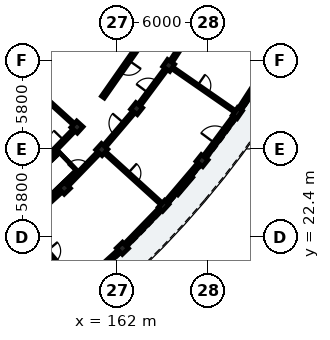
"""IFC4 building model, lengths in metres.
Left out: names, types, materials, properties, quantities, classifications, styles, units other than length and angle.
Written with IfcOpenShell. Run it as: python <this file> out.ifc"""

import sys

from ifc_helpers import new_model, si_unit, direction, frame, frame_2d, origin, origin_2d, place, context, subcontext, project, spatial, rectangle, extrude, element, fill, save


model = new_model("IFC4")
c1 = context("Model", 3, precision=1e-05, world=origin(), true_north=direction((0.0, 1.0)))
c2 = subcontext(c1, "Body", "Model", "MODEL_VIEW")
j1 = project(units=[si_unit("LENGTHUNIT", "METRE"), si_unit("PLANEANGLEUNIT", "RADIAN")], contexts=[c1])
p1 = place(None, origin())
s1 = spatial("IfcSite", under=j1, at=p1, CompositionType="ELEMENT")
p2 = place(p1, origin())
s2 = spatial("IfcBuilding", under=s1, at=p2, CompositionType="ELEMENT")
p3 = place(p2, frame((0.0, 0.0, 15.56)))
s3 = spatial("IfcBuildingStorey", under=s2, at=p3, CompositionType="ELEMENT", Elevation=15.56)
for number, where, z_axis, x_axis in (
    (1, (158.546, 25.62, 0.0), (0.0, 0.0, 1.0), (0.695, -0.719, 0.0)),
    (2, (162.367, 21.663, 0.0), (0.0, 0.0, 1.0), (0.695, -0.719, 0.0)),
    (3, (159.38, 29.638, 0.0), (0.0, 0.0, 1.0), (0.74, -0.672, 0.0)),
    (4, (161.009, 28.159, 0.0), (0.0, 0.0, 1.0), (0.74, -0.672, 0.0)),
):
    element("IfcColumn", number, at=place(p3, frame(where, z_axis=z_axis, x_axis=x_axis)), inside=s3, PredefinedType="COLUMN", context=c2, shape_type="SweptSolid", body=[
        extrude(rectangle(XDim=0.56, YDim=0.56, at=origin_2d()), origin(), (0.0, 0.0, 1.0), 3.11),
    ])
p4 = place(p3, frame((165.08, 24.46, 0.0), z_axis=(0.0, 0.0, 1.0), x_axis=(0.740218127487, -0.672366807435, 0.0)))
e5 = element("IfcColumn", 5, at=p4, inside=s3, PredefinedType="PILASTER", context=c2, shape_type="SweptSolid", body=[
    extrude(rectangle(XDim=0.38, YDim=0.62, at=origin_2d()), origin(), (0.0, 0.0, 1.0), 3.11),
])
for number, where, z_axis, x_axis in (
    (6, (163.3, 30.853, 0.0), (0.0, 0.0, 1.0), (0.783, -0.623, 0.0)),
    (7, (167.604, 27.429, 0.0), (0.0, 0.0, 1.0), (0.783, -0.623, 0.0)),
    (8, (165.41, 33.692, 0.0), (0.0, 0.0, 1.0), (0.822, -0.57, 0.0)),
):
    element("IfcColumn", number, at=place(p3, frame(where, z_axis=z_axis, x_axis=x_axis)), inside=s3, PredefinedType="COLUMN", context=c2, shape_type="SweptSolid", body=[
        extrude(rectangle(XDim=0.56, YDim=0.56, at=origin_2d()), origin(), (0.0, 0.0, 1.0), 3.11),
    ])
p5 = place(p3, frame((169.929, 30.557, 0.0), z_axis=(0.0, 0.0, 1.0), x_axis=(0.821646937942, -0.569996762596, 0.0)))
e9 = element("IfcColumn", 9, at=p5, inside=s3, PredefinedType="PILASTER", context=c2, shape_type="SweptSolid", body=[
    extrude(rectangle(XDim=0.38, YDim=0.62, at=origin_2d()), origin(), (0.0, 0.0, 1.0), 3.11),
])
p6 = place(p3, frame((159.595, 19.157, 0.0), z_axis=(0.0, 0.0, 1.0), x_axis=(0.741648568445, 0.670788641022, 0.0)))
e10 = element("IfcWall", 10, at=p6, inside=s3, PredefinedType="SOLIDWALL", context=c2, shape_type="SweptSolid", body=[
    extrude(rectangle(XDim=3.487, YDim=0.24, at=frame_2d((1.743, 0.0))), origin(), (0.0, 0.0, 1.0), 2.355),
])
p7 = place(p6, frame((1.068, 0.0, 0.35)))
e11 = element("IfcOpeningElement", 11, at=p7, cuts=e10, PredefinedType="OPENING", context=c2, shape_type="SweptSolid", body=[
    extrude(rectangle(XDim=1.35, YDim=1.65, at=frame_2d((0.675, 0.825))), frame((0.0, 0.13, 0.0), z_axis=(0.0, -1.0, 0.0), x_axis=(1.0, 0.0, 0.0)), (0.0, 0.0, 1.0), 0.26),
])
p8 = place(p3, frame((162.541, 21.843, 0.0), z_axis=(0.0, 0.0, 1.0), x_axis=(0.696205978342, 0.717842068788, 0.0)))
e12 = element("IfcWall", 12, at=p8, inside=s3, PredefinedType="SOLIDWALL", context=c2, shape_type="SweptSolid", body=[
    extrude(rectangle(XDim=3.487, YDim=0.24, at=frame_2d((1.743, 0.0))), origin(), (0.0, 0.0, 1.0), 2.355),
])
p9 = place(p8, frame((0.993, 0.0, 0.35)))
e13 = element("IfcOpeningElement", 13, at=p9, cuts=e12, PredefinedType="OPENING", context=c2, shape_type="SweptSolid", body=[
    extrude(rectangle(XDim=1.5, YDim=1.7, at=frame_2d((0.75, 0.85))), frame((0.0, 0.13, 0.0), z_axis=(0.0, -1.0, 0.0), x_axis=(1.0, 0.0, 0.0)), (0.0, 0.0, 1.0), 0.26),
])
p10 = place(p3, frame((165.184, 24.583, 0.0), z_axis=(0.0, 0.0, 1.0), x_axis=(0.647811002696, 0.761801092665, 0.0)))
e14 = element("IfcWall", 14, at=p10, inside=s3, PredefinedType="SOLIDWALL", context=c2, shape_type="SweptSolid", body=[
    extrude(rectangle(XDim=3.487, YDim=0.24, at=frame_2d((1.743, 0.0))), origin(), (0.0, 0.0, 1.0), 2.355),
])
p11 = place(p10, frame((0.918, 0.0, 0.35)))
e15 = element("IfcOpeningElement", 15, at=p11, cuts=e14, PredefinedType="OPENING", context=c2, shape_type="SweptSolid", body=[
    extrude(rectangle(XDim=1.65, YDim=1.8, at=frame_2d((0.825, 0.9))), frame((0.0, 0.13, 0.0), z_axis=(0.0, -1.0, 0.0), x_axis=(1.0, 0.0, 0.0)), (0.0, 0.0, 1.0), 0.26),
])
p12 = place(p3, frame((167.753, 27.63, 0.0), z_axis=(0.0, 0.0, 1.0), x_axis=(0.596611432616, 0.802530247699, 0.0)))
e16 = element("IfcWall", 16, at=p12, inside=s3, PredefinedType="SOLIDWALL", context=c2, shape_type="SweptSolid", body=[
    extrude(rectangle(XDim=3.487, YDim=0.24, at=frame_2d((1.743, 0.0))), origin(), (0.0, 0.0, 1.0), 2.355),
])
p13 = place(p12, frame((1.173, 0.0, 0.0)))
e17 = element("IfcOpeningElement", 17, at=p13, cuts=e16, PredefinedType="OPENING", context=c2, shape_type="SweptSolid", body=[
    extrude(rectangle(XDim=1.14, YDim=2.16, at=frame_2d((0.57, 1.08))), frame((0.0, 0.13, 0.0), z_axis=(0.0, -1.0, 0.0), x_axis=(1.0, 0.0, 0.0)), (0.0, 0.0, 1.0), 0.26),
])
p14 = place(p3, frame((170.016, 30.691, 0.0), z_axis=(0.0, 0.0, 1.0), x_axis=(0.542833164741, 0.839840553472, 0.0)))
e18 = element("IfcWall", 18, at=p14, inside=s3, PredefinedType="SOLIDWALL", context=c2, shape_type="SweptSolid", body=[
    extrude(rectangle(XDim=3.487, YDim=0.24, at=frame_2d((1.743, 0.0))), origin(), (0.0, 0.0, 1.0), 2.355),
])
p15 = place(p14, frame((1.104, 0.0, 0.55)))
e19 = element("IfcOpeningElement", 19, at=p15, cuts=e18, PredefinedType="OPENING", context=c2, shape_type="SweptSolid", body=[
    extrude(rectangle(XDim=1.28, YDim=1.52, at=frame_2d((0.64, 0.76))), frame((0.0, 0.13, 0.0), z_axis=(0.0, -1.0, 0.0), x_axis=(1.0, 0.0, 0.0)), (0.0, 0.0, 1.0), 0.26),
])
p16 = place(p3, frame((163.895, 35.624, 0.0), z_axis=(0.0, 0.0, 1.0), x_axis=(-0.573572687386, -0.819154669329, 0.0)))
e20 = element("IfcWall", 20, at=p16, inside=s3, PredefinedType="PARTITIONING", context=c2, shape_type="SweptSolid", body=[
    extrude(rectangle(XDim=4.9, YDim=0.22, at=frame_2d((2.45, 0.0))), origin(), (0.0, 0.0, 1.0), 2.34),
])
p17 = place(p16, frame((1.95, 0.0, 0.0)))
e21 = element("IfcOpeningElement", 21, at=p17, cuts=e20, PredefinedType="OPENING", context=c2, shape_type="SweptSolid", body=[
    extrude(rectangle(XDim=0.98, YDim=2.14, at=frame_2d((0.49, 1.07))), frame((0.0, 0.12, 0.0), z_axis=(0.0, -1.0, 0.0), x_axis=(1.0, 0.0, 0.0)), (0.0, 0.0, 1.0), 0.24),
])
p18 = place(p3, frame((156.181, 22.942, 0.0), z_axis=(0.0, 0.0, 1.0), x_axis=(0.646137818229, -0.76322075434, 0.0)))
e22 = element("IfcWall", 22, at=p18, inside=s3, PredefinedType="PARTITIONING", context=c2, shape_type="SweptSolid", body=[
    extrude(rectangle(XDim=4.7, YDim=0.125, at=frame_2d((2.35, 0.0))), origin(), (0.0, 0.0, 1.0), 2.37),
])
p19 = place(p18, frame((1.905, 0.0, 0.0)))
e23 = element("IfcOpeningElement", 23, at=p19, cuts=e22, PredefinedType="OPENING", context=c2, shape_type="SweptSolid", body=[
    extrude(rectangle(XDim=0.89, YDim=2.1, at=frame_2d((0.445, 1.05))), frame((0.0, 0.073, 0.0), z_axis=(0.0, -1.0, 0.0), x_axis=(1.0, 0.0, 0.0)), (0.0, 0.0, 1.0), 0.145),
])
p20 = place(p3, frame((156.183, 23.482, 0.0), z_axis=(0.0, 0.0, 1.0), x_axis=(0.741631592147, 0.670807410163, 0.0)))
e24 = element("IfcWall", 24, at=p20, inside=s3, PredefinedType="PARTITIONING", context=c2, shape_type="SweptSolid", body=[
    extrude(rectangle(XDim=2.837, YDim=0.195, at=frame_2d((1.418, 0.0))), origin(), (0.0, 0.0, 1.0), 2.37),
])
p21 = place(p20, frame((0.944, 0.0, 0.0)))
e25 = element("IfcOpeningElement", 25, at=p21, cuts=e24, PredefinedType="OPENING", context=c2, shape_type="SweptSolid", body=[
    extrude(rectangle(XDim=0.95, YDim=2.13, at=frame_2d((0.475, 1.065))), frame((0.0, 0.107, 0.0), z_axis=(0.0, -1.0, 0.0), x_axis=(1.0, 0.0, 0.0)), (0.0, 0.0, 1.0), 0.215),
])
p22 = place(p3, frame((158.79, 25.871, 0.0), z_axis=(0.0, 0.0, 1.0), x_axis=(0.696223786753, 0.717824796701, 0.0)))
e26 = element("IfcWall", 26, at=p22, inside=s3, PredefinedType="PARTITIONING", context=c2, shape_type="SweptSolid", body=[
    extrude(rectangle(XDim=2.837, YDim=0.195, at=frame_2d((1.418, 0.0))), origin(), (0.0, 0.0, 1.0), 2.37),
])
p23 = place(p22, frame((0.954, 0.0, 0.0)))
e27 = element("IfcOpeningElement", 27, at=p23, cuts=e26, PredefinedType="OPENING", context=c2, shape_type="SweptSolid", body=[
    extrude(rectangle(XDim=0.93, YDim=2.12, at=frame_2d((0.465, 1.06))), frame((0.0, 0.107, 0.0), z_axis=(0.0, -1.0, 0.0), x_axis=(1.0, 0.0, 0.0)), (0.0, 0.0, 1.0), 0.215),
])
p24 = place(p3, frame((157.262, 27.453, 0.0), z_axis=(0.0, 0.0, 1.0), x_axis=(0.696236443412, 0.717812520694, 0.0)))
e28 = element("IfcWall", 28, at=p24, inside=s3, PredefinedType="PARTITIONING", context=c2, shape_type="SweptSolid", body=[
    extrude(rectangle(XDim=2.693, YDim=0.195, at=frame_2d((1.347, 0.0))), origin(), (0.0, 0.0, 1.0), 2.37),
])
p25 = place(p24, frame((0.882, 0.0, 0.0)))
e29 = element("IfcOpeningElement", 29, at=p25, cuts=e28, PredefinedType="OPENING", context=c2, shape_type="SweptSolid", body=[
    extrude(rectangle(XDim=0.93, YDim=2.12, at=frame_2d((0.465, 1.06))), frame((0.0, 0.107, 0.0), z_axis=(0.0, -1.0, 0.0), x_axis=(1.0, 0.0, 0.0)), (0.0, 0.0, 1.0), 0.215),
])
p26 = place(p3, frame((161.305, 27.89, 0.0), z_axis=(0.0, 0.0, 1.0), x_axis=(0.740212663782, -0.672372822456, 0.0)))
e30 = element("IfcWall", 30, at=p26, inside=s3, PredefinedType="PLUMBINGWALL", context=c2, shape_type="SweptSolid", body=[
    extrude(rectangle(XDim=4.7, YDim=0.15, at=frame_2d((2.35, 0.0))), origin(), (0.0, 0.0, 1.0), 2.37),
])
p27 = place(p26, frame((1.925, 0.0, 0.0)))
e31 = element("IfcOpeningElement", 31, at=p27, cuts=e30, PredefinedType="OPENING", context=c2, shape_type="SweptSolid", body=[
    extrude(rectangle(XDim=0.85, YDim=2.05, at=frame_2d((0.425, 1.025))), frame((0.0, 0.085, 0.0), z_axis=(0.0, -1.0, 0.0), x_axis=(1.0, 0.0, 0.0)), (0.0, 0.0, 1.0), 0.17),
])
p28 = place(p3, frame((154.199, 34.344, 0.0), z_axis=(0.0, 0.0, 1.0), x_axis=(0.74023124711, -0.672352363573, 0.0)))
e32 = element("IfcWall", 32, at=p28, inside=s3, PredefinedType="PARTITIONING", context=c2, shape_type="SweptSolid", body=[
    extrude(rectangle(XDim=6.6, YDim=0.125, at=frame_2d((3.3, 0.0))), origin(), (0.0, 0.0, 1.0), 2.37),
])
p29 = place(p28, frame((2.855, 0.0, 0.0)))
e33 = element("IfcOpeningElement", 33, at=p29, cuts=e32, PredefinedType="OPENING", context=c2, shape_type="SweptSolid", body=[
    extrude(rectangle(XDim=0.89, YDim=2.1, at=frame_2d((0.445, 1.05))), frame((0.0, 0.073, 0.0), z_axis=(0.0, -1.0, 0.0), x_axis=(1.0, 0.0, 0.0)), (0.0, 0.0, 1.0), 0.145),
])
p30 = place(p3, frame((161.236, 28.425, 0.0), z_axis=(0.0, 0.0, 1.0), x_axis=(0.64778830669, 0.761820392032, 0.0)))
e34 = element("IfcWall", 34, at=p30, inside=s3, PredefinedType="PARTITIONING", context=c2, shape_type="SweptSolid", body=[
    extrude(rectangle(XDim=2.837, YDim=0.195, at=frame_2d((1.418, 0.0))), origin(), (0.0, 0.0, 1.0), 2.37),
])
p31 = place(p30, frame((0.924, 0.0, 0.0)))
e35 = element("IfcOpeningElement", 35, at=p31, cuts=e34, PredefinedType="OPENING", context=c2, shape_type="SweptSolid", body=[
    extrude(rectangle(XDim=0.99, YDim=2.16, at=frame_2d((0.495, 1.08))), frame((0.0, 0.107, 0.0), z_axis=(0.0, -1.0, 0.0), x_axis=(1.0, 0.0, 0.0)), (0.0, 0.0, 1.0), 0.215),
])
p32 = place(p3, frame((163.509, 31.134, 0.0), z_axis=(0.0, 0.0, 1.0), x_axis=(0.596552136601, 0.802574325727, 0.0)))
e36 = element("IfcWall", 36, at=p32, inside=s3, PredefinedType="PARTITIONING", context=c2, shape_type="SweptSolid", body=[
    extrude(rectangle(XDim=2.837, YDim=0.195, at=frame_2d((1.418, 0.0))), origin(), (0.0, 0.0, 1.0), 2.37),
])
p33 = place(p32, frame((0.934, 0.0, 0.0)))
e37 = element("IfcOpeningElement", 37, at=p33, cuts=e36, PredefinedType="OPENING", context=c2, shape_type="SweptSolid", body=[
    extrude(rectangle(XDim=0.97, YDim=2.15, at=frame_2d((0.485, 1.075))), frame((0.0, 0.107, 0.0), z_axis=(0.0, -1.0, 0.0), x_axis=(1.0, 0.0, 0.0)), (0.0, 0.0, 1.0), 0.215),
])
p34 = place(p3, frame((165.739, 33.464, 0.0), z_axis=(0.0, 0.0, 1.0), x_axis=(0.821638260647, -0.570009270663, 0.0)))
e38 = element("IfcWall", 38, at=p34, inside=s3, PredefinedType="PARTITIONING", context=c2, shape_type="SweptSolid", body=[
    extrude(rectangle(XDim=4.7, YDim=0.125, at=frame_2d((2.35, 0.0))), origin(), (0.0, 0.0, 1.0), 2.37),
])
p35 = place(p34, frame((1.915, 0.0, 0.0)))
e39 = element("IfcOpeningElement", 39, at=p35, cuts=e38, PredefinedType="OPENING", context=c2, shape_type="SweptSolid", body=[
    extrude(rectangle(XDim=0.87, YDim=2.08, at=frame_2d((0.435, 1.04))), frame((0.0, 0.073, 0.0), z_axis=(0.0, -1.0, 0.0), x_axis=(1.0, 0.0, 0.0)), (0.0, 0.0, 1.0), 0.145),
])
p36 = place(p3, frame((165.6, 33.986, 0.0), z_axis=(0.0, 0.0, 1.0), x_axis=(0.542787304957, 0.83987019329, 0.0)))
e40 = element("IfcWall", 40, at=p36, inside=s3, PredefinedType="PARTITIONING", context=c2, shape_type="SweptSolid", body=[
    extrude(rectangle(XDim=2.837, YDim=0.195, at=frame_2d((1.418, 0.0))), origin(), (0.0, 0.0, 1.0), 2.37),
])
p37 = place(p36, frame((0.944, 0.0, 0.0)))
e41 = element("IfcOpeningElement", 41, at=p37, cuts=e40, PredefinedType="OPENING", context=c2, shape_type="SweptSolid", body=[
    extrude(rectangle(XDim=0.95, YDim=2.13, at=frame_2d((0.475, 1.065))), frame((0.0, 0.107, 0.0), z_axis=(0.0, -1.0, 0.0), x_axis=(1.0, 0.0, 0.0)), (0.0, 0.0, 1.0), 0.215),
])
p38 = place(p9, origin())
e42 = element("IfcWindow", 42, at=p38, inside=s3, PartitioningType="SINGLE_PANEL", PredefinedType="WINDOW", context=c2, shape_type="SweptSolid", body=[
    extrude(rectangle(XDim=1.5, YDim=1.7, at=frame_2d((0.75, 0.85))), frame((0.0, 0.03, 0.0), z_axis=(0.0, -1.0, 0.0), x_axis=(1.0, 0.0, 0.0)), (0.0, 0.0, 1.0), 0.06),
])
fill(e13, e42)
p39 = place(p11, origin())
e43 = element("IfcWindow", 43, at=p39, inside=s3, PartitioningType="SINGLE_PANEL", PredefinedType="WINDOW", context=c2, shape_type="SweptSolid", body=[
    extrude(rectangle(XDim=1.65, YDim=1.8, at=frame_2d((0.825, 0.9))), frame((0.0, 0.03, 0.0), z_axis=(0.0, -1.0, 0.0), x_axis=(1.0, 0.0, 0.0)), (0.0, 0.0, 1.0), 0.06),
])
fill(e15, e43)
p40 = place(p13, origin())
e44 = element("IfcDoor", 44, at=p40, inside=s3, OperationType="SINGLE_SWING_LEFT", PredefinedType="DOOR", context=c2, shape_type="SweptSolid", body=[
    extrude(rectangle(XDim=1.14, YDim=2.16, at=frame_2d((0.57, 1.08))), frame((0.0, 0.025, 0.0), z_axis=(0.0, -1.0, 0.0), x_axis=(1.0, 0.0, 0.0)), (0.0, 0.0, 1.0), 0.05),
])
fill(e17, e44)
p41 = place(p15, origin())
e45 = element("IfcWindow", 45, at=p41, inside=s3, PartitioningType="SINGLE_PANEL", PredefinedType="WINDOW", context=c2, shape_type="SweptSolid", body=[
    extrude(rectangle(XDim=1.28, YDim=1.52, at=frame_2d((0.64, 0.76))), frame((0.0, 0.03, 0.0), z_axis=(0.0, -1.0, 0.0), x_axis=(1.0, 0.0, 0.0)), (0.0, 0.0, 1.0), 0.06),
])
fill(e19, e45)
p42 = place(p17, origin())
e46 = element("IfcDoor", 46, at=p42, inside=s3, OperationType="SINGLE_SWING_LEFT", PredefinedType="DOOR", context=c2, shape_type="SweptSolid", body=[
    extrude(rectangle(XDim=0.98, YDim=2.14, at=frame_2d((0.49, 1.07))), frame((0.0, 0.025, 0.0), z_axis=(0.0, -1.0, 0.0), x_axis=(1.0, 0.0, 0.0)), (0.0, 0.0, 1.0), 0.05),
])
fill(e21, e46)
p43 = place(p19, origin())
e47 = element("IfcDoor", 47, at=p43, inside=s3, OperationType="SINGLE_SWING_LEFT", PredefinedType="DOOR", context=c2, shape_type="SweptSolid", body=[
    extrude(rectangle(XDim=0.89, YDim=2.1, at=frame_2d((0.445, 1.05))), frame((0.0, 0.025, 0.0), z_axis=(0.0, -1.0, 0.0), x_axis=(1.0, 0.0, 0.0)), (0.0, 0.0, 1.0), 0.05),
])
fill(e23, e47)
p44 = place(p23, origin())
e48 = element("IfcDoor", 48, at=p44, inside=s3, OperationType="SINGLE_SWING_LEFT", PredefinedType="DOOR", context=c2, shape_type="SweptSolid", body=[
    extrude(rectangle(XDim=0.93, YDim=2.12, at=frame_2d((0.465, 1.06))), frame((0.0, 0.025, 0.0), z_axis=(0.0, -1.0, 0.0), x_axis=(1.0, 0.0, 0.0)), (0.0, 0.0, 1.0), 0.05),
])
fill(e27, e48)
p45 = place(p25, origin())
e49 = element("IfcDoor", 49, at=p45, inside=s3, OperationType="SINGLE_SWING_RIGHT", PredefinedType="DOOR", context=c2, shape_type="SweptSolid", body=[
    extrude(rectangle(XDim=0.93, YDim=2.12, at=frame_2d((0.465, 1.06))), frame((0.0, 0.025, 0.0), z_axis=(0.0, -1.0, 0.0), x_axis=(1.0, 0.0, 0.0)), (0.0, 0.0, 1.0), 0.05),
])
fill(e29, e49)
p46 = place(p27, origin())
e50 = element("IfcDoor", 50, at=p46, inside=s3, OperationType="SINGLE_SWING_LEFT", PredefinedType="DOOR", context=c2, shape_type="SweptSolid", body=[
    extrude(rectangle(XDim=0.85, YDim=2.05, at=frame_2d((0.425, 1.025))), frame((0.0, 0.025, 0.0), z_axis=(0.0, -1.0, 0.0), x_axis=(1.0, 0.0, 0.0)), (0.0, 0.0, 1.0), 0.05),
])
fill(e31, e50)
p47 = place(p31, origin())
e51 = element("IfcDoor", 51, at=p47, inside=s3, OperationType="SINGLE_SWING_RIGHT", PredefinedType="DOOR", context=c2, shape_type="SweptSolid", body=[
    extrude(rectangle(XDim=0.99, YDim=2.16, at=frame_2d((0.495, 1.08))), frame((0.0, 0.025, 0.0), z_axis=(0.0, -1.0, 0.0), x_axis=(1.0, 0.0, 0.0)), (0.0, 0.0, 1.0), 0.05),
])
fill(e35, e51)
p48 = place(p33, origin())
e52 = element("IfcDoor", 52, at=p48, inside=s3, OperationType="SINGLE_SWING_LEFT", PredefinedType="DOOR", context=c2, shape_type="SweptSolid", body=[
    extrude(rectangle(XDim=0.97, YDim=2.15, at=frame_2d((0.485, 1.075))), frame((0.0, 0.025, 0.0), z_axis=(0.0, -1.0, 0.0), x_axis=(1.0, 0.0, 0.0)), (0.0, 0.0, 1.0), 0.05),
])
fill(e37, e52)
p49 = place(p35, origin())
e53 = element("IfcDoor", 53, at=p49, inside=s3, OperationType="SINGLE_SWING_LEFT", PredefinedType="DOOR", context=c2, shape_type="SweptSolid", body=[
    extrude(rectangle(XDim=0.87, YDim=2.08, at=frame_2d((0.435, 1.04))), frame((0.0, 0.025, 0.0), z_axis=(0.0, -1.0, 0.0), x_axis=(1.0, 0.0, 0.0)), (0.0, 0.0, 1.0), 0.05),
])
fill(e39, e53)
save(model, sys.argv[1])
